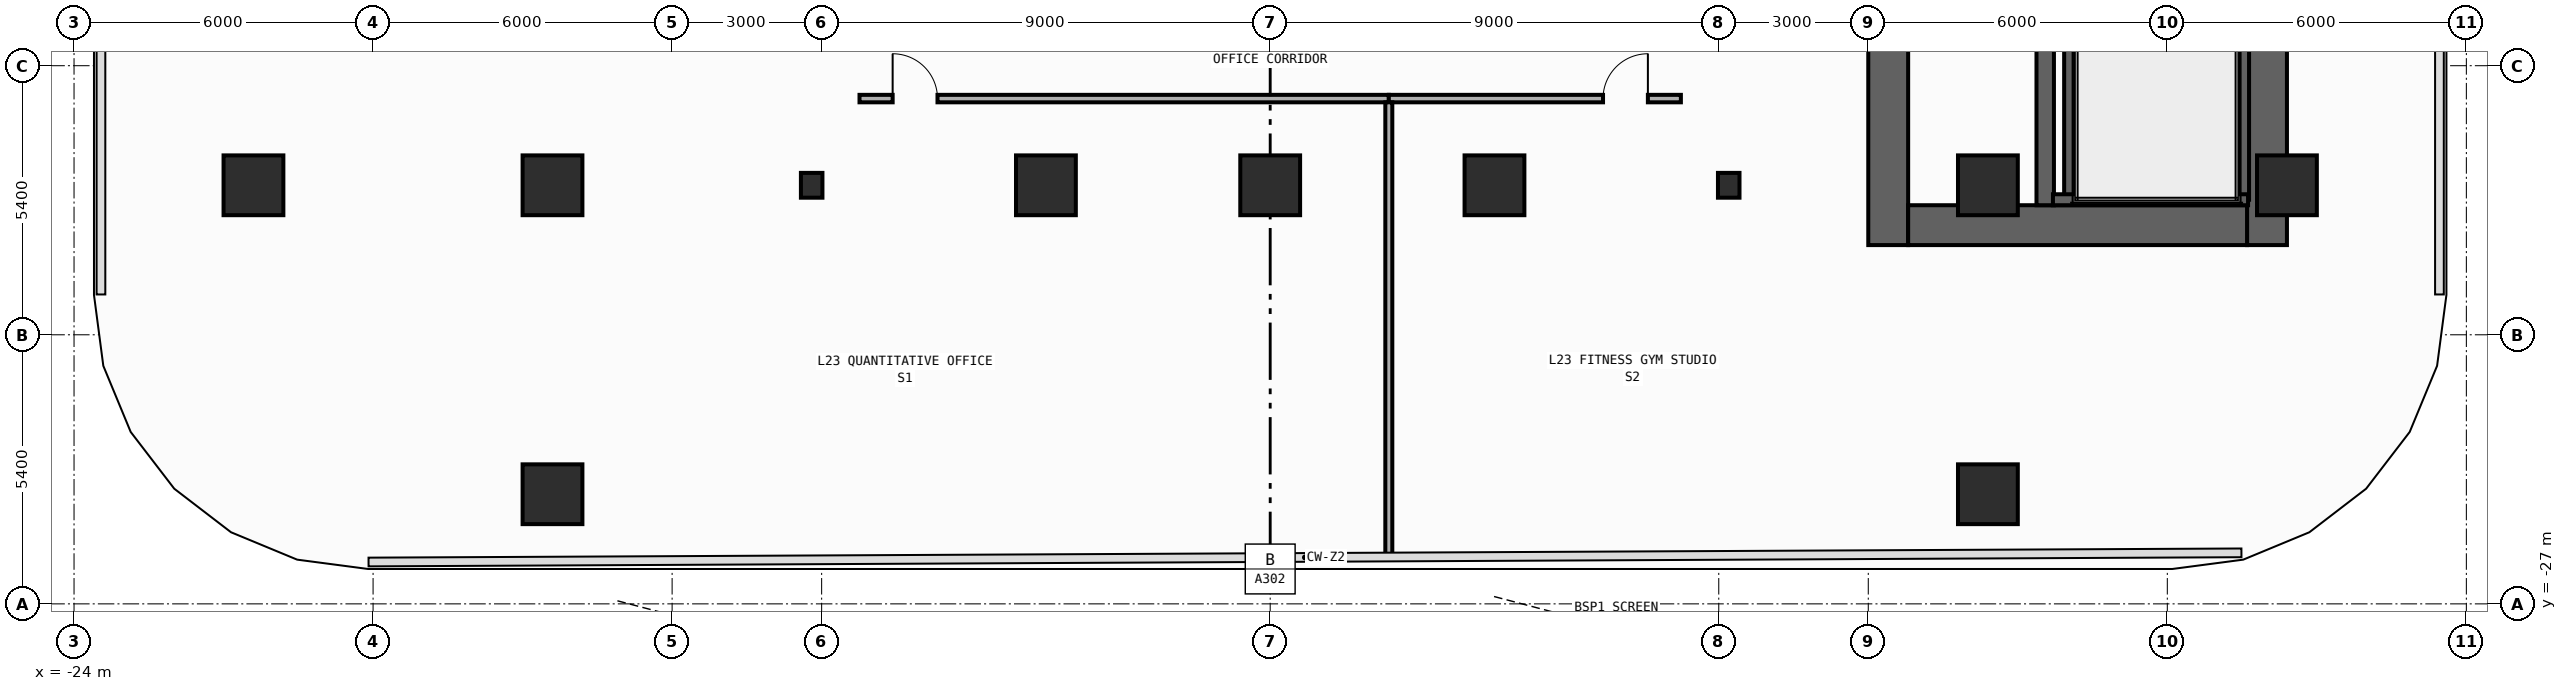
"""IFC4 building model, lengths in metres.
Left out: names, types, materials, properties, quantities, classifications, styles, units other than length and angle.
Written with IfcOpenShell. Run it as: python <this file> out.ifc"""

import sys

from ifc_helpers import new_model, si_unit, direction, frame, frame_2d, origin, origin_2d, place, context, subcontext, project, spatial, rectangle, i_section, extrude, element, fill, save


model = new_model("IFC4")
c1 = context("Model", 3, precision=1e-05, world=origin(), true_north=direction((0.0, 1.0)))
c2 = subcontext(c1, "Body", "Model", "MODEL_VIEW")
j1 = project(units=[si_unit("LENGTHUNIT", "METRE"), si_unit("PLANEANGLEUNIT", "RADIAN")], contexts=[c1])
p1 = place(None, origin())
s1 = spatial("IfcSite", under=j1, at=p1, CompositionType="ELEMENT")
p2 = place(p1, origin())
s2 = spatial("IfcBuilding", under=s1, at=p2, CompositionType="ELEMENT")
p3 = place(p2, frame((0.0, 0.0, 101.6)))
s3 = spatial("IfcBuildingStorey", under=s2, at=p3, CompositionType="ELEMENT", Elevation=101.6)
p4 = place(p3, frame((12.4, -19.8, 0.0), z_axis=(0.0, 0.0, 1.0), x_axis=(0.0, 1.0, 0.0)))
e1 = element("IfcWall", 1, at=p4, inside=s3, PredefinedType="SHEAR", context=c2, shape_type="SweptSolid", body=[
    extrude(rectangle(XDim=27.0, YDim=0.8, at=frame_2d((13.5, 0.0))), origin(), (0.0, 0.0, 1.0), 3.94),
])
p5 = place(p4, frame((23.05, 0.0, 0.0)))
e2 = element("IfcOpeningElement", 2, at=p5, cuts=e1, PredefinedType="OPENING", context=c2, shape_type="SweptSolid", body=[
    extrude(rectangle(XDim=1.1, YDim=2.2, at=frame_2d((0.55, 1.1))), frame((0.0, 0.41, 0.0), z_axis=(0.0, -1.0, 0.0), x_axis=(1.0, 0.0, 0.0)), (0.0, 0.0, 1.0), 0.82),
])
p6 = place(p4, frame((19.85, 0.0, 0.0)))
e3 = element("IfcOpeningElement", 3, at=p6, cuts=e1, PredefinedType="OPENING", context=c2, shape_type="SweptSolid", body=[
    extrude(rectangle(XDim=1.1, YDim=2.2, at=frame_2d((0.55, 1.1))), frame((0.0, 0.41, 0.0), z_axis=(0.0, -1.0, 0.0), x_axis=(1.0, 0.0, 0.0)), (0.0, 0.0, 1.0), 0.82),
])
p7 = place(p4, frame((16.65, 0.0, 0.0)))
e4 = element("IfcOpeningElement", 4, at=p7, cuts=e1, PredefinedType="OPENING", context=c2, shape_type="SweptSolid", body=[
    extrude(rectangle(XDim=1.1, YDim=2.2, at=frame_2d((0.55, 1.1))), frame((0.0, 0.41, 0.0), z_axis=(0.0, -1.0, 0.0), x_axis=(1.0, 0.0, 0.0)), (0.0, 0.0, 1.0), 0.82),
])
p8 = place(p4, frame((10.175, 0.0, 0.0)))
e5 = element("IfcOpeningElement", 5, at=p8, cuts=e1, PredefinedType="OPENING", context=c2, shape_type="SweptSolid", body=[
    extrude(rectangle(XDim=0.85, YDim=2.1, at=frame_2d((0.425, 1.05))), frame((0.0, 0.41, 0.0), z_axis=(0.0, -1.0, 0.0), x_axis=(1.0, 0.0, 0.0)), (0.0, 0.0, 1.0), 0.82),
])
p9 = place(p4, frame((12.725, 0.0, 0.0)))
e6 = element("IfcOpeningElement", 6, at=p9, cuts=e1, PredefinedType="OPENING", context=c2, shape_type="SweptSolid", body=[
    extrude(rectangle(XDim=1.15, YDim=2.2, at=frame_2d((0.575, 1.1))), frame((0.0, 0.41, 0.0), z_axis=(0.0, -1.0, 0.0), x_axis=(1.0, 0.0, 0.0)), (0.0, 0.0, 1.0), 0.82),
])
p10 = place(p4, frame((25.125, 0.0, 0.0)))
e7 = element("IfcOpeningElement", 7, at=p10, cuts=e1, PredefinedType="OPENING", context=c2, shape_type="SweptSolid", body=[
    extrude(rectangle(XDim=0.85, YDim=2.1, at=frame_2d((0.425, 1.05))), frame((0.0, 0.41, 0.0), z_axis=(0.0, -1.0, 0.0), x_axis=(1.0, 0.0, 0.0)), (0.0, 0.0, 1.0), 0.82),
])
p11 = place(p3, frame((20.0, -19.8, 0.0), z_axis=(0.0, 0.0, 1.0), x_axis=(0.0, 1.0, 0.0)))
e8 = element("IfcWall", 8, at=p11, inside=s3, PredefinedType="SHEAR", context=c2, shape_type="SweptSolid", body=[
    extrude(rectangle(XDim=27.0, YDim=0.8, at=frame_2d((13.5, 0.0))), origin(), (0.0, 0.0, 1.0), 3.94),
])
p12 = place(p3, frame((12.8, -19.4, 0.0), z_axis=(0.0, 0.0, 1.0), x_axis=(1.0, 0.0, 0.0)))
e9 = element("IfcWall", 9, at=p12, inside=s3, PredefinedType="SHEAR", context=c2, shape_type="SweptSolid", body=[
    extrude(rectangle(XDim=6.8, YDim=0.8, at=frame_2d((3.4, 0.0))), origin(), (0.0, 0.0, 1.0), 3.94),
])
p13 = place(p3, frame((15.55, -19.0, 0.0), z_axis=(0.0, 0.0, 1.0), x_axis=(0.0, 1.0, 0.0)))
e10 = element("IfcWall", 10, at=p13, inside=s3, PredefinedType="SHEAR", context=c2, shape_type="SweptSolid", body=[
    extrude(rectangle(XDim=25.4, YDim=0.35, at=frame_2d((12.7, 0.0))), origin(), (0.0, 0.0, 1.0), 3.94),
])
p14 = place(p13, frame((11.925, 0.0, 0.0)))
e11 = element("IfcOpeningElement", 11, at=p14, cuts=e10, PredefinedType="OPENING", context=c2, shape_type="SweptSolid", body=[
    extrude(rectangle(XDim=1.15, YDim=2.2, at=frame_2d((0.575, 1.1))), frame((0.0, 0.185, 0.0), z_axis=(0.0, -1.0, 0.0), x_axis=(1.0, 0.0, 0.0)), (0.0, 0.0, 1.0), 0.37),
])
p15 = place(p13, frame((24.325, 0.0, 0.0)))
e12 = element("IfcOpeningElement", 12, at=p15, cuts=e10, PredefinedType="OPENING", context=c2, shape_type="SweptSolid", body=[
    extrude(rectangle(XDim=0.85, YDim=2.1, at=frame_2d((0.425, 1.05))), frame((0.0, 0.185, 0.0), z_axis=(0.0, -1.0, 0.0), x_axis=(1.0, 0.0, 0.0)), (0.0, 0.0, 1.0), 0.37),
])
for number, where, z_axis, x_axis in (
    (13, (16.04, -18.89, 0.0), (0.0, 0.0, 1.0), (0.0, 1.0, 0.0)),
    (14, (19.53, -18.89, 0.0), (0.0, 0.0, 1.0), (0.0, 1.0, 0.0)),
):
    element("IfcWall", number, at=place(p3, frame(where, z_axis=z_axis, x_axis=x_axis)), inside=s3, PredefinedType="SHEAR", context=c2, shape_type="SweptSolid", body=[
        extrude(rectangle(XDim=11.3, YDim=0.22, at=frame_2d((5.65, 0.0))), origin(), (0.0, 0.0, 1.0), 3.94),
    ])
p16 = place(p3, frame((15.705, -18.89, 0.0), z_axis=(0.0, 0.0, 1.0), x_axis=(1.0, 0.0, 0.0)))
e15 = element("IfcWall", 15, at=p16, inside=s3, PredefinedType="SHEAR", context=c2, shape_type="SweptSolid", body=[
    extrude(rectangle(XDim=3.915, YDim=0.22, at=frame_2d((1.958, 0.0))), origin(), (0.0, 0.0, 1.0), 3.94),
])
for number, where, z_axis, x_axis in (
    (16, (-9.2, -18.6, 0.0), (0.0, 0.0, 1.0), (1.0, 0.0, 0.0)),
    (17, (9.2, -18.6, 0.0), (0.0, 0.0, 1.0), (1.0, 0.0, 0.0)),
):
    element("IfcColumn", number, at=place(p3, frame(where, z_axis=z_axis, x_axis=x_axis)), inside=s3, PredefinedType="COLUMN", context=c2, shape_type="SweptSolid", body=[
        extrude(i_section(OverallWidth=0.432, OverallDepth=0.498, WebThickness=0.045, FlangeThickness=0.07, FilletRadius=0.022, at=origin_2d()), origin(), (0.0, 0.0, 1.0), 4.2),
    ])
for number, where, z_axis, x_axis in (
    (18, (-20.4, -18.6, 0.0), (0.0, 0.0, 1.0), (1.0, 0.0, 0.0)),
    (19, (20.4, -18.6, 0.0), (0.0, 0.0, 1.0), (1.0, 0.0, 0.0)),
    (20, (-14.4, -18.6, 0.0), (0.0, 0.0, 1.0), (1.0, 0.0, 0.0)),
    (21, (14.4, -18.6, 0.0), (0.0, 0.0, 1.0), (1.0, 0.0, 0.0)),
    (22, (-4.5, -18.6, 0.0), (0.0, 0.0, 1.0), (1.0, 0.0, 0.0)),
    (23, (0.0, -18.6, 0.0), (0.0, 0.0, 1.0), (1.0, 0.0, 0.0)),
    (24, (4.5, -18.6, 0.0), (0.0, 0.0, 1.0), (1.0, 0.0, 0.0)),
    (25, (-14.4, -24.8, 0.0), (0.0, 0.0, 1.0), (1.0, 0.0, 0.0)),
    (26, (14.4, -24.8, 0.0), (0.0, 0.0, 1.0), (1.0, 0.0, 0.0)),
):
    element("IfcColumn", number, at=place(p3, frame(where, z_axis=z_axis, x_axis=x_axis)), inside=s3, PredefinedType="COLUMN", context=c2, shape_type="SweptSolid", body=[
        extrude(rectangle(XDim=1.2, YDim=1.2, at=origin_2d()), origin(), (0.0, 0.0, 1.0), 4.2),
    ])
p17 = place(p3, frame((-8.24, -16.86, 0.0), z_axis=(0.0, 0.0, 1.0), x_axis=(1.0, 0.0, 0.0)))
e27 = element("IfcWall", 27, at=p17, inside=s3, PredefinedType="PARTITIONING", context=c2, shape_type="SweptSolid", body=[
    extrude(rectangle(XDim=10.62, YDim=0.15, at=frame_2d((5.31, 0.0))), origin(), (0.0, 0.0, 1.0), 3.94),
])
p18 = place(p17, frame((0.665, 0.0, 0.0)))
e28 = element("IfcOpeningElement", 28, at=p18, cuts=e27, PredefinedType="OPENING", context=c2, shape_type="SweptSolid", body=[
    extrude(rectangle(XDim=0.9, YDim=2.15, at=frame_2d((0.45, 1.075))), frame((0.0, 0.085, 0.0), z_axis=(0.0, -1.0, 0.0), x_axis=(1.0, 0.0, 0.0)), (0.0, 0.0, 1.0), 0.17),
])
p19 = place(p3, frame((2.38, -16.86, 0.0), z_axis=(0.0, 0.0, 1.0), x_axis=(1.0, 0.0, 0.0)))
e29 = element("IfcWall", 29, at=p19, inside=s3, PredefinedType="PARTITIONING", context=c2, shape_type="SweptSolid", body=[
    extrude(rectangle(XDim=5.86, YDim=0.15, at=frame_2d((2.93, 0.0))), origin(), (0.0, 0.0, 1.0), 3.94),
])
p20 = place(p19, frame((4.298, 0.0, 0.0)))
e30 = element("IfcOpeningElement", 30, at=p20, cuts=e29, PredefinedType="OPENING", context=c2, shape_type="SweptSolid", body=[
    extrude(rectangle(XDim=0.9, YDim=2.15, at=frame_2d((0.45, 1.075))), frame((0.0, 0.085, 0.0), z_axis=(0.0, -1.0, 0.0), x_axis=(1.0, 0.0, 0.0)), (0.0, 0.0, 1.0), 0.17),
])
p21 = place(p3, frame((2.38, -26.055, 0.0), z_axis=(0.0, 0.0, 1.0), x_axis=(0.0, 1.0, 0.0)))
e31 = element("IfcWall", 31, at=p21, inside=s3, PredefinedType="PARTITIONING", context=c2, shape_type="SweptSolid", body=[
    extrude(rectangle(XDim=9.12, YDim=0.14, at=frame_2d((4.56, 0.0))), origin(), (0.0, 0.0, 1.0), 3.94),
])
p22 = place(p18, origin())
e32 = element("IfcDoor", 32, at=p22, inside=s3, OperationType="SINGLE_SWING_LEFT", PredefinedType="DOOR", context=c2, shape_type="SweptSolid", body=[
    extrude(rectangle(XDim=0.9, YDim=2.15, at=frame_2d((0.45, 1.075))), frame((0.0, 0.025, 0.0), z_axis=(0.0, -1.0, 0.0), x_axis=(1.0, 0.0, 0.0)), (0.0, 0.0, 1.0), 0.05),
])
fill(e28, e32)
p23 = place(p20, origin())
e33 = element("IfcDoor", 33, at=p23, inside=s3, OperationType="SINGLE_SWING_RIGHT", PredefinedType="DOOR", context=c2, shape_type="SweptSolid", body=[
    extrude(rectangle(XDim=0.9, YDim=2.15, at=frame_2d((0.45, 1.075))), frame((0.0, 0.025, 0.0), z_axis=(0.0, -1.0, 0.0), x_axis=(1.0, 0.0, 0.0)), (0.0, 0.0, 1.0), 0.05),
])
fill(e30, e33)
save(model, sys.argv[1])
